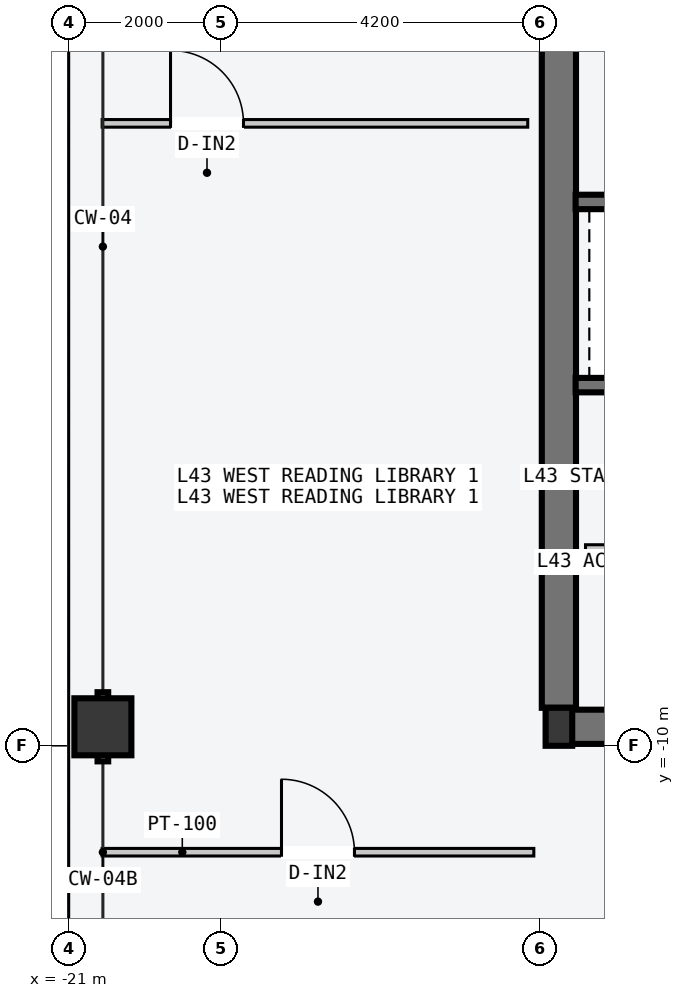
"""IFC4 building model, lengths in metres.
Left out: names, types, materials, properties, quantities, classifications, styles, units other than length and angle.
Written with IfcOpenShell. Run it as: python <this file> out.ifc"""

import sys

from ifc_helpers import new_model, si_unit, direction, frame, frame_2d, origin, origin_2d, place, context, subcontext, project, spatial, rectangle, hollow_rectangle, i_section, extrude, element, fill, save


model = new_model("IFC4")
c1 = context("Model", 3, precision=1e-05, world=origin(), true_north=direction((0.0, 1.0)))
c2 = subcontext(c1, "Body", "Model", "MODEL_VIEW")
j1 = project(units=[si_unit("LENGTHUNIT", "METRE"), si_unit("PLANEANGLEUNIT", "RADIAN")], contexts=[c1])
p1 = place(None, origin())
s1 = spatial("IfcSite", under=j1, at=p1, CompositionType="ELEMENT")
p2 = place(p1, origin())
s2 = spatial("IfcBuilding", under=s1, at=p2, CompositionType="ELEMENT")
p3 = place(p2, frame((0.0, 0.0, 165.9)))
s3 = spatial("IfcBuildingStorey", under=s2, at=p3, CompositionType="ELEMENT", Elevation=165.9)
p4 = place(p3, frame((-14.53, -9.75, -0.2), z_axis=(0.0, 0.0, 1.0), x_axis=(1.0, 0.0, 0.0)))
e1 = element("IfcWall", 1, at=p4, inside=s3, PredefinedType="SHEAR", context=c2, shape_type="SweptSolid", body=[
    extrude(rectangle(XDim=6.46, YDim=0.45, at=frame_2d((3.23, 0.0))), origin(), (0.0, 0.0, 1.0), 3.6),
])
p5 = place(p3, frame((-14.55, -9.5, -0.2), z_axis=(0.0, 0.0, 1.0), x_axis=(0.0, 1.0, 0.0)))
e2 = element("IfcWall", 2, at=p5, inside=s3, PredefinedType="SHEAR", context=c2, shape_type="SweptSolid", body=[
    extrude(rectangle(XDim=9.25, YDim=0.45, at=frame_2d((4.625, 0.0))), origin(), (0.0, 0.0, 1.0), 3.6),
])
p6 = place(p3, frame((-14.55, -9.75, 0.0), z_axis=(0.0, 0.0, 1.0), x_axis=(1.0, 0.0, 0.0)))
e3 = element("IfcColumn", 3, at=p6, inside=s3, PredefinedType="COLUMN", context=c2, shape_type="SweptSolid", body=[
    extrude(i_section(OverallWidth=0.35, OverallDepth=0.5, WebThickness=0.02, FlangeThickness=0.032, at=origin_2d()), origin(), (0.0, 0.0, 1.0), 3.6),
])
p7 = place(p3, frame((-20.55, -9.75, 0.0), z_axis=(0.0, 0.0, 1.0), x_axis=(0.0, 1.0, 0.0)))
e4 = element("IfcColumn", 4, at=p7, inside=s3, PredefinedType="COLUMN", context=c2, shape_type="SweptSolid", body=[
    extrude(hollow_rectangle(XDim=0.75, YDim=0.75, WallThickness=0.032, at=origin_2d()), origin(), (0.0, 0.0, 1.0), 3.6),
])
p8 = place(p3, frame((-14.33, -2.845, -0.2), z_axis=(0.0, 0.0, 1.0), x_axis=(1.0, 0.0, 0.0)))
e5 = element("IfcWall", 5, at=p8, inside=s3, PredefinedType="SOLIDWALL", context=c2, shape_type="SweptSolid", body=[
    extrude(rectangle(XDim=2.68, YDim=0.19, at=frame_2d((1.34, 0.0))), origin(), (0.0, 0.0, 1.0), 3.6),
])
p9 = place(p8, frame((0.83, 0.0, 0.2)))
e6 = element("IfcOpeningElement", 6, at=p9, cuts=e5, PredefinedType="OPENING", context=c2, shape_type="SweptSolid", body=[
    extrude(rectangle(XDim=1.2, YDim=2.2, at=frame_2d((0.6, 1.1))), frame((0.0, 0.105, 0.0), z_axis=(0.0, -1.0, 0.0), x_axis=(1.0, 0.0, 0.0)), (0.0, 0.0, 1.0), 0.21),
])
p10 = place(p3, frame((-14.33, -5.255, -0.2), z_axis=(0.0, 0.0, 1.0), x_axis=(1.0, 0.0, 0.0)))
e7 = element("IfcWall", 7, at=p10, inside=s3, PredefinedType="SOLIDWALL", context=c2, shape_type="SweptSolid", body=[
    extrude(rectangle(XDim=2.68, YDim=0.19, at=frame_2d((1.34, 0.0))), origin(), (0.0, 0.0, 1.0), 3.6),
])
p11 = place(p3, frame((-11.7, -7.425, 0.0), z_axis=(0.0, 0.0, 1.0), x_axis=(-1.0, 0.0, 0.0)))
e8 = element("IfcWall", 8, at=p11, inside=s3, PredefinedType="PARTITIONING", context=c2, shape_type="SweptSolid", body=[
    extrude(rectangle(XDim=2.5, YDim=0.14, at=frame_2d((1.25, 0.0))), origin(), (0.0, 0.0, 1.0), 3.4),
])
p12 = place(p3, frame((-20.56, -11.4, 0.0), z_axis=(0.0, 0.0, 1.0), x_axis=(1.0, 0.0, 0.0)))
e9 = element("IfcWall", 9, at=p12, inside=s3, PredefinedType="PARTITIONING", context=c2, shape_type="SweptSolid", body=[
    extrude(rectangle(XDim=5.68, YDim=0.1, at=frame_2d((2.84, 0.0))), origin(), (0.0, 0.0, 1.0), 3.4),
])
p13 = place(p12, frame((2.36, 0.0, 0.0)))
e10 = element("IfcOpeningElement", 10, at=p13, cuts=e9, PredefinedType="OPENING", context=c2, shape_type="SweptSolid", body=[
    extrude(rectangle(XDim=0.96, YDim=2.18, at=frame_2d((0.48, 1.09))), frame((0.0, 0.06, 0.0), z_axis=(0.0, -1.0, 0.0), x_axis=(1.0, 0.0, 0.0)), (0.0, 0.0, 1.0), 0.12),
])
p14 = place(p3, frame((-20.56, -1.811, 0.0), z_axis=(0.0, 0.0, 1.0), x_axis=(1.0, 0.0, 0.0)))
e11 = element("IfcWall", 11, at=p14, inside=s3, PredefinedType="PARTITIONING", context=c2, shape_type="SweptSolid", body=[
    extrude(rectangle(XDim=5.6, YDim=0.1, at=frame_2d((2.8, 0.0))), origin(), (0.0, 0.0, 1.0), 3.4),
])
p15 = place(p14, frame((0.9, 0.0, 0.0)))
e12 = element("IfcOpeningElement", 12, at=p15, cuts=e11, PredefinedType="OPENING", context=c2, shape_type="SweptSolid", body=[
    extrude(rectangle(XDim=0.96, YDim=2.18, at=frame_2d((0.48, 1.09))), frame((0.0, 0.06, 0.0), z_axis=(0.0, -1.0, 0.0), x_axis=(1.0, 0.0, 0.0)), (0.0, 0.0, 1.0), 0.12),
])
p16 = place(p13, origin())
e13 = element("IfcDoor", 13, at=p16, inside=s3, OperationType="SINGLE_SWING_LEFT", PredefinedType="DOOR", context=c2, shape_type="SweptSolid", body=[
    extrude(rectangle(XDim=0.96, YDim=2.18, at=frame_2d((0.48, 1.09))), frame((0.0, 0.025, 0.0), z_axis=(0.0, -1.0, 0.0), x_axis=(1.0, 0.0, 0.0)), (0.0, 0.0, 1.0), 0.05),
])
fill(e10, e13)
p17 = place(p15, origin())
e14 = element("IfcDoor", 14, at=p17, inside=s3, OperationType="SINGLE_SWING_LEFT", PredefinedType="DOOR", context=c2, shape_type="SweptSolid", body=[
    extrude(rectangle(XDim=0.96, YDim=2.18, at=frame_2d((0.48, 1.09))), frame((0.0, 0.025, 0.0), z_axis=(0.0, -1.0, 0.0), x_axis=(1.0, 0.0, 0.0)), (0.0, 0.0, 1.0), 0.05),
])
fill(e12, e14)
save(model, sys.argv[1])
